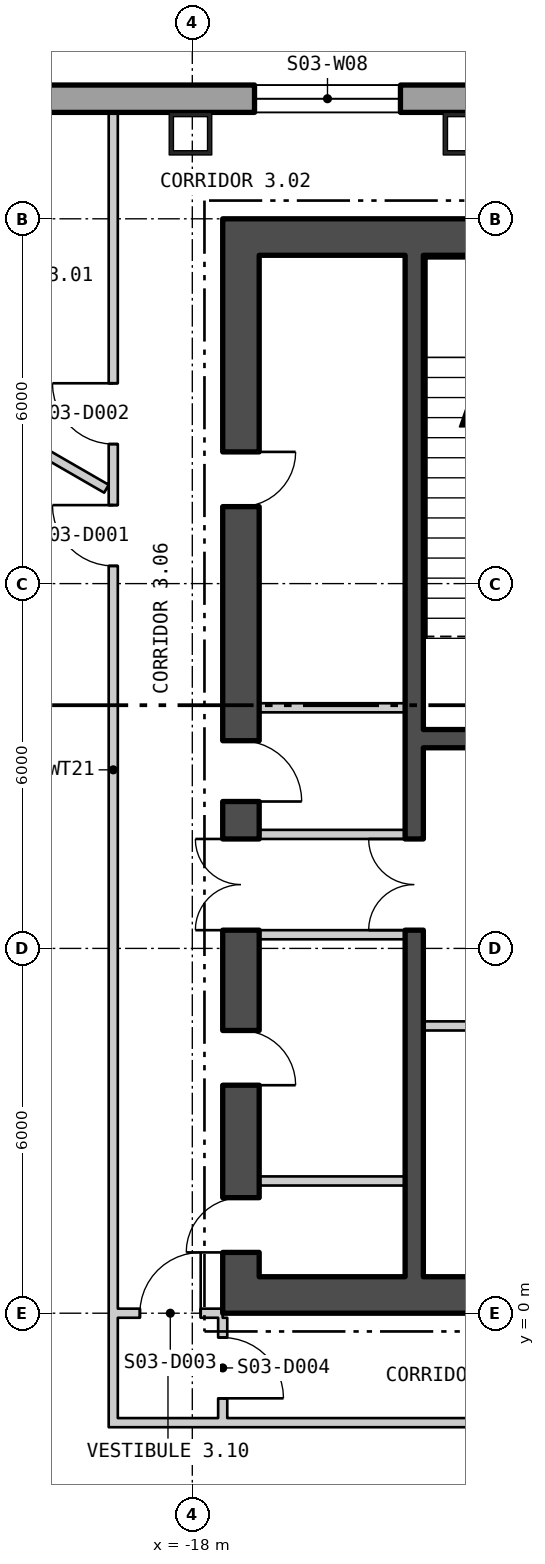
"""IFC4 building model, lengths in metres.
Left out: names, types, materials, properties, quantities, classifications, styles, units other than length and angle.
Written with IfcOpenShell. Run it as: python <this file> out.ifc"""

import sys

from ifc_helpers import new_model, si_unit, direction, frame, frame_2d, origin, origin_2d, place, context, subcontext, project, spatial, polyline, rectangle, hollow_rectangle, outline, extrude, element, fill, save


model = new_model("IFC4")
c1 = context("Model", 3, precision=1e-05, world=origin(), true_north=direction((0.0, 1.0)))
c2 = subcontext(c1, "Body", "Model", "MODEL_VIEW")
j1 = project(units=[si_unit("LENGTHUNIT", "METRE"), si_unit("PLANEANGLEUNIT", "RADIAN")], contexts=[c1])
p1 = place(None, origin())
s1 = spatial("IfcSite", under=j1, at=p1, CompositionType="ELEMENT")
p2 = place(p1, origin())
s2 = spatial("IfcBuilding", under=s1, at=p2, CompositionType="ELEMENT")
p3 = place(p2, frame((0.0, 0.0, 46.8)))
s3 = spatial("IfcBuildingStorey", under=s2, at=p3, CompositionType="ELEMENT", Elevation=46.8)
for number, where, z_axis, x_axis in (
    (1, (-13.523, 19.4, 0.0), (0.0, 0.0, 1.0), (-1.0, 0.0, 0.0)),
    (2, (-18.03, 19.4, 0.0), (0.0, 0.0, 1.0), (-1.0, 0.0, 0.0)),
):
    element("IfcColumn", number, at=place(p3, frame(where, z_axis=z_axis, x_axis=x_axis)), inside=s3, PredefinedType="COLUMN", context=c2, shape_type="SweptSolid", body=[
        extrude(hollow_rectangle(XDim=0.7, YDim=0.7, WallThickness=0.07, at=origin_2d()), origin(), (0.0, 0.0, 1.0), 4.5),
    ])
p4 = place(p3, frame((22.87, 19.975, -0.4), z_axis=(0.0, 0.0, 1.0), x_axis=(-1.0, 0.0, 0.0)))
e3 = element("IfcWall", 3, at=p4, inside=s3, PredefinedType="SOLIDWALL", context=c2, shape_type="SweptSolid", body=[
    extrude(outline(polyline([(-0.13, -0.225), (45.87, -0.225), (45.61, 0.225), (0.13, 0.225), (-0.13, -0.225)])), origin(), (0.0, 0.0, 1.0), 4.5),
])
p5 = place(p4, frame((5.893, 0.0, 1.3)))
e4 = element("IfcOpeningElement", 4, at=p5, cuts=e3, PredefinedType="OPENING", context=c2, shape_type="SweptSolid", body=[
    extrude(rectangle(XDim=2.4, YDim=2.6, at=frame_2d((1.2, 1.3))), frame((0.0, 0.235, 0.0), z_axis=(0.0, -1.0, 0.0), x_axis=(1.0, 0.0, 0.0)), (0.0, 0.0, 1.0), 0.47),
])
p6 = place(p4, frame((10.401, 0.0, 1.3)))
e5 = element("IfcOpeningElement", 5, at=p6, cuts=e3, PredefinedType="OPENING", context=c2, shape_type="SweptSolid", body=[
    extrude(rectangle(XDim=2.4, YDim=2.6, at=frame_2d((1.2, 1.3))), frame((0.0, 0.235, 0.0), z_axis=(0.0, -1.0, 0.0), x_axis=(1.0, 0.0, 0.0)), (0.0, 0.0, 1.0), 0.47),
])
p7 = place(p4, frame((14.909, 0.0, 1.3)))
e6 = element("IfcOpeningElement", 6, at=p7, cuts=e3, PredefinedType="OPENING", context=c2, shape_type="SweptSolid", body=[
    extrude(rectangle(XDim=2.4, YDim=2.6, at=frame_2d((1.2, 1.3))), frame((0.0, 0.235, 0.0), z_axis=(0.0, -1.0, 0.0), x_axis=(1.0, 0.0, 0.0)), (0.0, 0.0, 1.0), 0.47),
])
p8 = place(p4, frame((19.416, 0.0, 1.3)))
e7 = element("IfcOpeningElement", 7, at=p8, cuts=e3, PredefinedType="OPENING", context=c2, shape_type="SweptSolid", body=[
    extrude(rectangle(XDim=2.4, YDim=2.6, at=frame_2d((1.2, 1.3))), frame((0.0, 0.235, 0.0), z_axis=(0.0, -1.0, 0.0), x_axis=(1.0, 0.0, 0.0)), (0.0, 0.0, 1.0), 0.47),
])
p9 = place(p4, frame((23.924, 0.0, 1.3)))
e8 = element("IfcOpeningElement", 8, at=p9, cuts=e3, PredefinedType="OPENING", context=c2, shape_type="SweptSolid", body=[
    extrude(rectangle(XDim=2.4, YDim=2.6, at=frame_2d((1.2, 1.3))), frame((0.0, 0.235, 0.0), z_axis=(0.0, -1.0, 0.0), x_axis=(1.0, 0.0, 0.0)), (0.0, 0.0, 1.0), 0.47),
])
p10 = place(p4, frame((28.431, 0.0, 1.3)))
e9 = element("IfcOpeningElement", 9, at=p10, cuts=e3, PredefinedType="OPENING", context=c2, shape_type="SweptSolid", body=[
    extrude(rectangle(XDim=2.4, YDim=2.6, at=frame_2d((1.2, 1.3))), frame((0.0, 0.235, 0.0), z_axis=(0.0, -1.0, 0.0), x_axis=(1.0, 0.0, 0.0)), (0.0, 0.0, 1.0), 0.47),
])
p11 = place(p4, frame((32.939, 0.0, 1.3)))
e10 = element("IfcOpeningElement", 10, at=p11, cuts=e3, PredefinedType="OPENING", context=c2, shape_type="SweptSolid", body=[
    extrude(rectangle(XDim=2.4, YDim=2.6, at=frame_2d((1.2, 1.3))), frame((0.0, 0.235, 0.0), z_axis=(0.0, -1.0, 0.0), x_axis=(1.0, 0.0, 0.0)), (0.0, 0.0, 1.0), 0.47),
])
p12 = place(p4, frame((37.447, 0.0, 1.3)))
e11 = element("IfcOpeningElement", 11, at=p12, cuts=e3, PredefinedType="OPENING", context=c2, shape_type="SweptSolid", body=[
    extrude(rectangle(XDim=2.4, YDim=2.6, at=frame_2d((1.2, 1.3))), frame((0.0, 0.235, 0.0), z_axis=(0.0, -1.0, 0.0), x_axis=(1.0, 0.0, 0.0)), (0.0, 0.0, 1.0), 0.47),
])
p13 = place(p3, frame((-28.445, 10.319, -0.18), z_axis=(0.0, 0.0, 1.0), x_axis=(0.499999764979, -0.866025539474, 0.0)))
e12 = element("IfcWall", 12, at=p13, inside=s3, PredefinedType="SOLIDWALL", context=c2, shape_type="SweptSolid", body=[
    extrude(outline(polyline([(-0.13, -0.225), (45.87, -0.225), (45.61, 0.225), (0.13, 0.225), (-0.13, -0.225)])), origin(), (0.0, 0.0, 1.0), 4.28),
])
p14 = place(p13, frame((1.424, 0.0, 1.08)))
e13 = element("IfcOpeningElement", 13, at=p14, cuts=e12, PredefinedType="OPENING", context=c2, shape_type="SweptSolid", body=[
    extrude(rectangle(XDim=2.4, YDim=2.6, at=frame_2d((1.2, 1.3))), frame((0.0, 0.235, 0.0), z_axis=(0.0, -1.0, 0.0), x_axis=(1.0, 0.0, 0.0)), (0.0, 0.0, 1.0), 0.47),
])
p15 = place(p13, frame((5.893, 0.0, 1.08)))
e14 = element("IfcOpeningElement", 14, at=p15, cuts=e12, PredefinedType="OPENING", context=c2, shape_type="SweptSolid", body=[
    extrude(rectangle(XDim=2.4, YDim=2.6, at=frame_2d((1.2, 1.3))), frame((0.0, 0.235, 0.0), z_axis=(0.0, -1.0, 0.0), x_axis=(1.0, 0.0, 0.0)), (0.0, 0.0, 1.0), 0.47),
])
p16 = place(p13, frame((10.401, 0.0, 1.08)))
e15 = element("IfcOpeningElement", 15, at=p16, cuts=e12, PredefinedType="OPENING", context=c2, shape_type="SweptSolid", body=[
    extrude(rectangle(XDim=2.4, YDim=2.6, at=frame_2d((1.2, 1.3))), frame((0.0, 0.235, 0.0), z_axis=(0.0, -1.0, 0.0), x_axis=(1.0, 0.0, 0.0)), (0.0, 0.0, 1.0), 0.47),
])
p17 = place(p13, frame((14.909, 0.0, 1.08)))
e16 = element("IfcOpeningElement", 16, at=p17, cuts=e12, PredefinedType="OPENING", context=c2, shape_type="SweptSolid", body=[
    extrude(rectangle(XDim=2.4, YDim=2.6, at=frame_2d((1.2, 1.3))), frame((0.0, 0.235, 0.0), z_axis=(0.0, -1.0, 0.0), x_axis=(1.0, 0.0, 0.0)), (0.0, 0.0, 1.0), 0.47),
])
p18 = place(p13, frame((19.416, 0.0, 1.08)))
e17 = element("IfcOpeningElement", 17, at=p18, cuts=e12, PredefinedType="OPENING", context=c2, shape_type="SweptSolid", body=[
    extrude(rectangle(XDim=2.4, YDim=2.6, at=frame_2d((1.2, 1.3))), frame((0.0, 0.235, 0.0), z_axis=(0.0, -1.0, 0.0), x_axis=(1.0, 0.0, 0.0)), (0.0, 0.0, 1.0), 0.47),
])
p19 = place(p13, frame((23.924, 0.0, 1.08)))
e18 = element("IfcOpeningElement", 18, at=p19, cuts=e12, PredefinedType="OPENING", context=c2, shape_type="SweptSolid", body=[
    extrude(rectangle(XDim=2.4, YDim=2.6, at=frame_2d((1.2, 1.3))), frame((0.0, 0.235, 0.0), z_axis=(0.0, -1.0, 0.0), x_axis=(1.0, 0.0, 0.0)), (0.0, 0.0, 1.0), 0.47),
])
p20 = place(p13, frame((28.431, 0.0, 1.08)))
e19 = element("IfcOpeningElement", 19, at=p20, cuts=e12, PredefinedType="OPENING", context=c2, shape_type="SweptSolid", body=[
    extrude(rectangle(XDim=2.4, YDim=2.6, at=frame_2d((1.2, 1.3))), frame((0.0, 0.235, 0.0), z_axis=(0.0, -1.0, 0.0), x_axis=(1.0, 0.0, 0.0)), (0.0, 0.0, 1.0), 0.47),
])
p21 = place(p13, frame((32.939, 0.0, 1.08)))
e20 = element("IfcOpeningElement", 20, at=p21, cuts=e12, PredefinedType="OPENING", context=c2, shape_type="SweptSolid", body=[
    extrude(rectangle(XDim=2.4, YDim=2.6, at=frame_2d((1.2, 1.3))), frame((0.0, 0.235, 0.0), z_axis=(0.0, -1.0, 0.0), x_axis=(1.0, 0.0, 0.0)), (0.0, 0.0, 1.0), 0.47),
])
p22 = place(p13, frame((37.447, 0.0, 1.08)))
e21 = element("IfcOpeningElement", 21, at=p22, cuts=e12, PredefinedType="OPENING", context=c2, shape_type="SweptSolid", body=[
    extrude(rectangle(XDim=2.4, YDim=2.6, at=frame_2d((1.2, 1.3))), frame((0.0, 0.235, 0.0), z_axis=(0.0, -1.0, 0.0), x_axis=(1.0, 0.0, 0.0)), (0.0, 0.0, 1.0), 0.47),
])
p23 = place(p13, frame((41.916, 0.0, 1.08)))
e22 = element("IfcOpeningElement", 22, at=p23, cuts=e12, PredefinedType="OPENING", context=c2, shape_type="SweptSolid", body=[
    extrude(rectangle(XDim=2.4, YDim=2.6, at=frame_2d((1.2, 1.3))), frame((0.0, 0.235, 0.0), z_axis=(0.0, -1.0, 0.0), x_axis=(1.0, 0.0, 0.0)), (0.0, 0.0, 1.0), 0.47),
])
p24 = place(p3, frame((-17.5, 0.3, 0.0), z_axis=(0.0, 0.0, 1.0), x_axis=(1.0, 0.0, 0.0)))
e23 = element("IfcWall", 23, at=p24, inside=s3, PredefinedType="SHEAR", context=c2, shape_type="SweptSolid", body=[
    extrude(rectangle(XDim=35.0, YDim=0.6, at=frame_2d((17.5, 0.0))), origin(), (0.0, 0.0, 1.0), 4.3),
])
p25 = place(p24, frame((12.0, 0.0, 0.0)))
e24 = element("IfcOpeningElement", 24, at=p25, cuts=e23, PredefinedType="OPENING", context=c2, shape_type="SweptSolid", body=[
    extrude(rectangle(XDim=1.8, YDim=2.4, at=frame_2d((0.9, 1.2))), frame((0.0, 0.31, 0.0), z_axis=(0.0, -1.0, 0.0), x_axis=(1.0, 0.0, 0.0)), (0.0, 0.0, 1.0), 0.62),
])
p26 = place(p24, frame((22.0, 0.0, 0.0)))
e25 = element("IfcOpeningElement", 25, at=p26, cuts=e23, PredefinedType="OPENING", context=c2, shape_type="SweptSolid", body=[
    extrude(rectangle(XDim=1.8, YDim=2.4, at=frame_2d((0.9, 1.2))), frame((0.0, 0.31, 0.0), z_axis=(0.0, -1.0, 0.0), x_axis=(1.0, 0.0, 0.0)), (0.0, 0.0, 1.0), 0.62),
])
p27 = place(p3, frame((-17.5, 17.7, 0.0), z_axis=(0.0, 0.0, 1.0), x_axis=(1.0, 0.0, 0.0)))
e26 = element("IfcWall", 26, at=p27, inside=s3, PredefinedType="SHEAR", context=c2, shape_type="SweptSolid", body=[
    extrude(rectangle(XDim=35.0, YDim=0.6, at=frame_2d((17.5, 0.0))), origin(), (0.0, 0.0, 1.0), 4.3),
])
p28 = place(p3, frame((-17.2, 0.6, 0.0), z_axis=(0.0, 0.0, 1.0), x_axis=(0.0, 1.0, 0.0)))
e27 = element("IfcWall", 27, at=p28, inside=s3, PredefinedType="SHEAR", context=c2, shape_type="SweptSolid", body=[
    extrude(rectangle(XDim=16.8, YDim=0.6, at=frame_2d((8.4, 0.0))), origin(), (0.0, 0.0, 1.0), 4.3),
])
p29 = place(p28, frame((5.7, 0.0, 0.0)))
e28 = element("IfcOpeningElement", 28, at=p29, cuts=e27, PredefinedType="OPENING", context=c2, shape_type="SweptSolid", body=[
    extrude(rectangle(XDim=1.5, YDim=2.1, at=frame_2d((0.75, 1.05))), frame((0.0, 0.31, 0.0), z_axis=(0.0, -1.0, 0.0), x_axis=(1.0, 0.0, 0.0)), (0.0, 0.0, 1.0), 0.62),
])
p30 = place(p28, frame((0.4, 0.0, 0.0)))
e29 = element("IfcOpeningElement", 29, at=p30, cuts=e27, PredefinedType="OPENING", context=c2, shape_type="SweptSolid", body=[
    extrude(rectangle(XDim=0.9, YDim=2.1, at=frame_2d((0.45, 1.05))), frame((0.0, 0.31, 0.0), z_axis=(0.0, -1.0, 0.0), x_axis=(1.0, 0.0, 0.0)), (0.0, 0.0, 1.0), 0.62),
])
p31 = place(p28, frame((3.15, 0.0, 0.0)))
e30 = element("IfcOpeningElement", 30, at=p31, cuts=e27, PredefinedType="OPENING", context=c2, shape_type="SweptSolid", body=[
    extrude(rectangle(XDim=0.9, YDim=2.1, at=frame_2d((0.45, 1.05))), frame((0.0, 0.31, 0.0), z_axis=(0.0, -1.0, 0.0), x_axis=(1.0, 0.0, 0.0)), (0.0, 0.0, 1.0), 0.62),
])
p32 = place(p28, frame((7.816, 0.0, 0.0)))
e31 = element("IfcOpeningElement", 31, at=p32, cuts=e27, PredefinedType="OPENING", context=c2, shape_type="SweptSolid", body=[
    extrude(rectangle(XDim=1.0, YDim=2.1, at=frame_2d((0.5, 1.05))), frame((0.0, 0.31, 0.0), z_axis=(0.0, -1.0, 0.0), x_axis=(1.0, 0.0, 0.0)), (0.0, 0.0, 1.0), 0.62),
])
p33 = place(p28, frame((12.666, 0.0, 0.0)))
e32 = element("IfcOpeningElement", 32, at=p33, cuts=e27, PredefinedType="OPENING", context=c2, shape_type="SweptSolid", body=[
    extrude(rectangle(XDim=0.9, YDim=2.1, at=frame_2d((0.45, 1.05))), frame((0.0, 0.31, 0.0), z_axis=(0.0, -1.0, 0.0), x_axis=(1.0, 0.0, 0.0)), (0.0, 0.0, 1.0), 0.62),
])
p34 = place(p3, frame((-14.35, 0.6, 0.0), z_axis=(0.0, 0.0, 1.0), x_axis=(0.0, 1.0, 0.0)))
e33 = element("IfcWall", 33, at=p34, inside=s3, PredefinedType="SHEAR", context=c2, shape_type="SweptSolid", body=[
    extrude(rectangle(XDim=16.8, YDim=0.3, at=frame_2d((8.4, 0.0))), origin(), (0.0, 0.0, 1.0), 4.3),
])
p35 = place(p34, frame((5.7, 0.0, 0.0)))
e34 = element("IfcOpeningElement", 34, at=p35, cuts=e33, PredefinedType="OPENING", context=c2, shape_type="SweptSolid", body=[
    extrude(rectangle(XDim=1.5, YDim=2.1, at=frame_2d((0.75, 1.05))), frame((0.0, 0.16, 0.0), z_axis=(0.0, -1.0, 0.0), x_axis=(1.0, 0.0, 0.0)), (0.0, 0.0, 1.0), 0.32),
])
p36 = place(p3, frame((-14.2, 9.45, 0.0), z_axis=(0.0, 0.0, 1.0), x_axis=(1.0, 0.0, 0.0)))
e35 = element("IfcWall", 35, at=p36, inside=s3, PredefinedType="SHEAR", context=c2, shape_type="SweptSolid", body=[
    extrude(rectangle(XDim=3.2, YDim=0.3, at=frame_2d((1.6, 0.0))), origin(), (0.0, 0.0, 1.0), 4.3),
])
p37 = place(p36, frame((1.0, 0.0, 0.0)))
e36 = element("IfcOpeningElement", 36, at=p37, cuts=e35, PredefinedType="OPENING", context=c2, shape_type="SweptSolid", body=[
    extrude(rectangle(XDim=1.2, YDim=2.1, at=frame_2d((0.6, 1.05))), frame((0.0, 0.16, 0.0), z_axis=(0.0, -1.0, 0.0), x_axis=(1.0, 0.0, 0.0)), (0.0, 0.0, 1.0), 0.32),
])
p38 = place(p3, frame((-14.2, 4.725, 0.0), z_axis=(0.0, 0.0, 1.0), x_axis=(1.0, 0.0, 0.0)))
e37 = element("IfcWall", 37, at=p38, inside=s3, PredefinedType="PARTITIONING", context=c2, shape_type="SweptSolid", body=[
    extrude(rectangle(XDim=3.2, YDim=0.15, at=frame_2d((1.6, 0.0))), origin(), (0.0, 0.0, 1.0), 4.3),
])
for number, where, z_axis, x_axis in (
    (38, (-16.9, 6.225, 0.0), (0.0, 0.0, 1.0), (1.0, 0.0, 0.0)),
    (39, (-16.9, 7.875, 0.0), (0.0, 0.0, 1.0), (1.0, 0.0, 0.0)),
    (40, (-16.9, 2.175, 0.0), (0.0, 0.0, 1.0), (1.0, 0.0, 0.0)),
    (41, (-16.9, 9.957, 0.0), (0.0, 0.0, 1.0), (1.0, 0.0, 0.0)),
):
    element("IfcWall", number, at=place(p3, frame(where, z_axis=z_axis, x_axis=x_axis)), inside=s3, PredefinedType="PARTITIONING", context=c2, shape_type="SweptSolid", body=[
        extrude(rectangle(XDim=2.4, YDim=0.15, at=frame_2d((1.2, 0.0))), origin(), (0.0, 0.0, 1.0), 4.3),
    ])
p39 = place(p3, frame((-24.199, 16.323, 0.0), z_axis=(0.0, 0.0, 1.0), x_axis=(0.866086170813, -0.499894733645, 0.0)))
e42 = element("IfcWall", 42, at=p39, inside=s3, PredefinedType="PARTITIONING", context=c2, shape_type="SweptSolid", body=[
    extrude(rectangle(XDim=5.527, YDim=0.15, at=frame_2d((2.764, 0.0))), origin(), (0.0, 0.0, 1.0), 4.3),
])
p40 = place(p3, frame((-19.3, -1.875, 0.0), z_axis=(0.0, 0.0, 1.0), x_axis=(0.0, 1.0, 0.0)))
e43 = element("IfcWall", 43, at=p40, inside=s3, PredefinedType="PARTITIONING", context=c2, shape_type="SweptSolid", body=[
    extrude(rectangle(XDim=21.624, YDim=0.15, at=frame_2d((10.812, 0.0))), origin(), (0.0, 0.0, 1.0), 4.3),
])
p41 = place(p40, frame((14.166, 0.0, 0.0)))
e44 = element("IfcOpeningElement", 44, at=p41, cuts=e43, PredefinedType="OPENING", context=c2, shape_type="SweptSolid", body=[
    extrude(rectangle(XDim=1.0, YDim=2.1, at=frame_2d((0.5, 1.05))), frame((0.0, 0.085, 0.0), z_axis=(0.0, -1.0, 0.0), x_axis=(1.0, 0.0, 0.0)), (0.0, 0.0, 1.0), 0.17),
])
p42 = place(p40, frame((16.17, 0.0, 0.0)))
e45 = element("IfcOpeningElement", 45, at=p42, cuts=e43, PredefinedType="OPENING", context=c2, shape_type="SweptSolid", body=[
    extrude(rectangle(XDim=1.0, YDim=2.1, at=frame_2d((0.5, 1.05))), frame((0.0, 0.085, 0.0), z_axis=(0.0, -1.0, 0.0), x_axis=(1.0, 0.0, 0.0)), (0.0, 0.0, 1.0), 0.17),
])
p43 = place(p3, frame((-19.225, -1.8, 0.0), z_axis=(0.0, 0.0, 1.0), x_axis=(1.0, 0.0, 0.0)))
e46 = element("IfcWall", 46, at=p43, inside=s3, PredefinedType="PARTITIONING", context=c2, shape_type="SweptSolid", body=[
    extrude(rectangle(XDim=11.3, YDim=0.15, at=frame_2d((5.65, 0.0))), origin(), (0.0, 0.0, 1.0), 4.3),
])
p44 = place(p3, frame((-19.225, 0.0, 0.0), z_axis=(0.0, 0.0, 1.0), x_axis=(1.0, 0.0, 0.0)))
e47 = element("IfcWall", 47, at=p44, inside=s3, PredefinedType="PARTITIONING", context=c2, shape_type="SweptSolid", body=[
    extrude(rectangle(XDim=1.725, YDim=0.15, at=frame_2d((0.863, 0.0))), origin(), (0.0, 0.0, 1.0), 3.61),
])
p45 = place(p44, frame((0.363, 0.0, 0.0)))
e48 = element("IfcOpeningElement", 48, at=p45, cuts=e47, PredefinedType="OPENING", context=c2, shape_type="SweptSolid", body=[
    extrude(rectangle(XDim=1.0, YDim=2.1, at=frame_2d((0.5, 1.05))), frame((0.0, 0.085, 0.0), z_axis=(0.0, -1.0, 0.0), x_axis=(1.0, 0.0, 0.0)), (0.0, 0.0, 1.0), 0.17),
])
p46 = place(p3, frame((-17.5, -1.725, 0.0), z_axis=(0.0, 0.0, 1.0), x_axis=(0.0, 1.0, 0.0)))
e49 = element("IfcWall", 49, at=p46, inside=s3, PredefinedType="PARTITIONING", context=c2, shape_type="SweptSolid", body=[
    extrude(rectangle(XDim=1.65, YDim=0.15, at=frame_2d((0.825, 0.0))), origin(), (0.0, 0.0, 1.0), 4.3),
])
p47 = place(p46, frame((0.325, 0.0, 0.0)))
e50 = element("IfcOpeningElement", 50, at=p47, cuts=e49, PredefinedType="OPENING", context=c2, shape_type="SweptSolid", body=[
    extrude(rectangle(XDim=1.0, YDim=2.1, at=frame_2d((0.5, 1.05))), frame((0.0, 0.085, 0.0), z_axis=(0.0, -1.0, 0.0), x_axis=(1.0, 0.0, 0.0)), (0.0, 0.0, 1.0), 0.17),
])
p48 = place(p12, origin())
e51 = element("IfcWindow", 51, at=p48, inside=s3, PartitioningType="SINGLE_PANEL", PredefinedType="WINDOW", context=c2, shape_type="SweptSolid", body=[
    extrude(rectangle(XDim=2.4, YDim=2.6, at=frame_2d((1.2, 1.3))), frame((0.0, 0.105, 0.0), z_axis=(0.0, -1.0, 0.0), x_axis=(1.0, 0.0, 0.0)), (0.0, 0.0, 1.0), 0.06),
])
fill(e11, e51)
p49 = place(p17, origin())
e52 = element("IfcWindow", 52, at=p49, inside=s3, PartitioningType="SINGLE_PANEL", PredefinedType="WINDOW", context=c2, shape_type="SweptSolid", body=[
    extrude(rectangle(XDim=2.4, YDim=2.6, at=frame_2d((1.2, 1.3))), frame((0.0, 0.105, 0.0), z_axis=(0.0, -1.0, 0.0), x_axis=(1.0, 0.0, 0.0)), (0.0, 0.0, 1.0), 0.06),
])
fill(e16, e52)
p50 = place(p35, origin())
e53 = element("IfcDoor", 53, at=p50, inside=s3, OperationType="DOUBLE_DOOR_SINGLE_SWING", PredefinedType="DOOR", context=c2, shape_type="SweptSolid", body=[
    extrude(rectangle(XDim=1.5, YDim=2.1, at=frame_2d((0.75, 1.05))), frame((0.0, 0.025, 0.0), z_axis=(0.0, -1.0, 0.0), x_axis=(1.0, 0.0, 0.0)), (0.0, 0.0, 1.0), 0.05),
])
fill(e34, e53)
p51 = place(p29, origin())
e54 = element("IfcDoor", 54, at=p51, inside=s3, OperationType="DOUBLE_DOOR_SINGLE_SWING", PredefinedType="DOOR", context=c2, shape_type="SweptSolid", body=[
    extrude(rectangle(XDim=1.5, YDim=2.1, at=frame_2d((0.75, 1.05))), frame((0.0, 0.025, 0.0), z_axis=(0.0, -1.0, 0.0), x_axis=(1.0, 0.0, 0.0)), (0.0, 0.0, 1.0), 0.05),
])
fill(e28, e54)
p52 = place(p30, origin())
e55 = element("IfcDoor", 55, at=p52, inside=s3, OperationType="SINGLE_SWING_RIGHT", PredefinedType="DOOR", context=c2, shape_type="SweptSolid", body=[
    extrude(rectangle(XDim=0.9, YDim=2.1, at=frame_2d((0.45, 1.05))), frame((0.0, 0.025, 0.0), z_axis=(0.0, -1.0, 0.0), x_axis=(1.0, 0.0, 0.0)), (0.0, 0.0, 1.0), 0.05),
])
fill(e29, e55)
p53 = place(p31, origin())
e56 = element("IfcDoor", 56, at=p53, inside=s3, OperationType="SINGLE_SWING_LEFT", PredefinedType="DOOR", context=c2, shape_type="SweptSolid", body=[
    extrude(rectangle(XDim=0.9, YDim=2.1, at=frame_2d((0.45, 1.05))), frame((0.0, 0.025, 0.0), z_axis=(0.0, -1.0, 0.0), x_axis=(1.0, 0.0, 0.0)), (0.0, 0.0, 1.0), 0.05),
])
fill(e30, e56)
p54 = place(p32, origin())
e57 = element("IfcDoor", 57, at=p54, inside=s3, OperationType="SINGLE_SWING_LEFT", PredefinedType="DOOR", context=c2, shape_type="SweptSolid", body=[
    extrude(rectangle(XDim=1.0, YDim=2.1, at=frame_2d((0.5, 1.05))), frame((0.0, 0.025, 0.0), z_axis=(0.0, -1.0, 0.0), x_axis=(1.0, 0.0, 0.0)), (0.0, 0.0, 1.0), 0.05),
])
fill(e31, e57)
p55 = place(p33, origin())
e58 = element("IfcDoor", 58, at=p55, inside=s3, OperationType="SINGLE_SWING_RIGHT", PredefinedType="DOOR", context=c2, shape_type="SweptSolid", body=[
    extrude(rectangle(XDim=0.9, YDim=2.1, at=frame_2d((0.45, 1.05))), frame((0.0, 0.025, 0.0), z_axis=(0.0, -1.0, 0.0), x_axis=(1.0, 0.0, 0.0)), (0.0, 0.0, 1.0), 0.05),
])
fill(e32, e58)
p56 = place(p41, origin())
e59 = element("IfcDoor", 59, at=p56, inside=s3, OperationType="SINGLE_SWING_LEFT", PredefinedType="DOOR", context=c2, shape_type="SweptSolid", body=[
    extrude(rectangle(XDim=1.0, YDim=2.1, at=frame_2d((0.5, 1.05))), frame((0.0, 0.025, 0.0), z_axis=(0.0, -1.0, 0.0), x_axis=(1.0, 0.0, 0.0)), (0.0, 0.0, 1.0), 0.05),
])
fill(e44, e59)
p57 = place(p42, origin())
e60 = element("IfcDoor", 60, at=p57, inside=s3, OperationType="SINGLE_SWING_LEFT", PredefinedType="DOOR", context=c2, shape_type="SweptSolid", body=[
    extrude(rectangle(XDim=1.0, YDim=2.1, at=frame_2d((0.5, 1.05))), frame((0.0, 0.025, 0.0), z_axis=(0.0, -1.0, 0.0), x_axis=(1.0, 0.0, 0.0)), (0.0, 0.0, 1.0), 0.05),
])
fill(e45, e60)
p58 = place(p45, origin())
e61 = element("IfcDoor", 61, at=p58, inside=s3, OperationType="SINGLE_SWING_LEFT", PredefinedType="DOOR", context=c2, shape_type="SweptSolid", body=[
    extrude(rectangle(XDim=1.0, YDim=2.1, at=frame_2d((0.5, 1.05))), frame((0.0, 0.025, 0.0), z_axis=(0.0, -1.0, 0.0), x_axis=(1.0, 0.0, 0.0)), (0.0, 0.0, 1.0), 0.05),
])
fill(e48, e61)
p59 = place(p47, origin())
e62 = element("IfcDoor", 62, at=p59, inside=s3, OperationType="SINGLE_SWING_LEFT", PredefinedType="DOOR", context=c2, shape_type="SweptSolid", body=[
    extrude(rectangle(XDim=1.0, YDim=2.1, at=frame_2d((0.5, 1.05))), frame((0.0, 0.025, 0.0), z_axis=(0.0, -1.0, 0.0), x_axis=(1.0, 0.0, 0.0)), (0.0, 0.0, 1.0), 0.05),
])
fill(e50, e62)
save(model, sys.argv[1])
